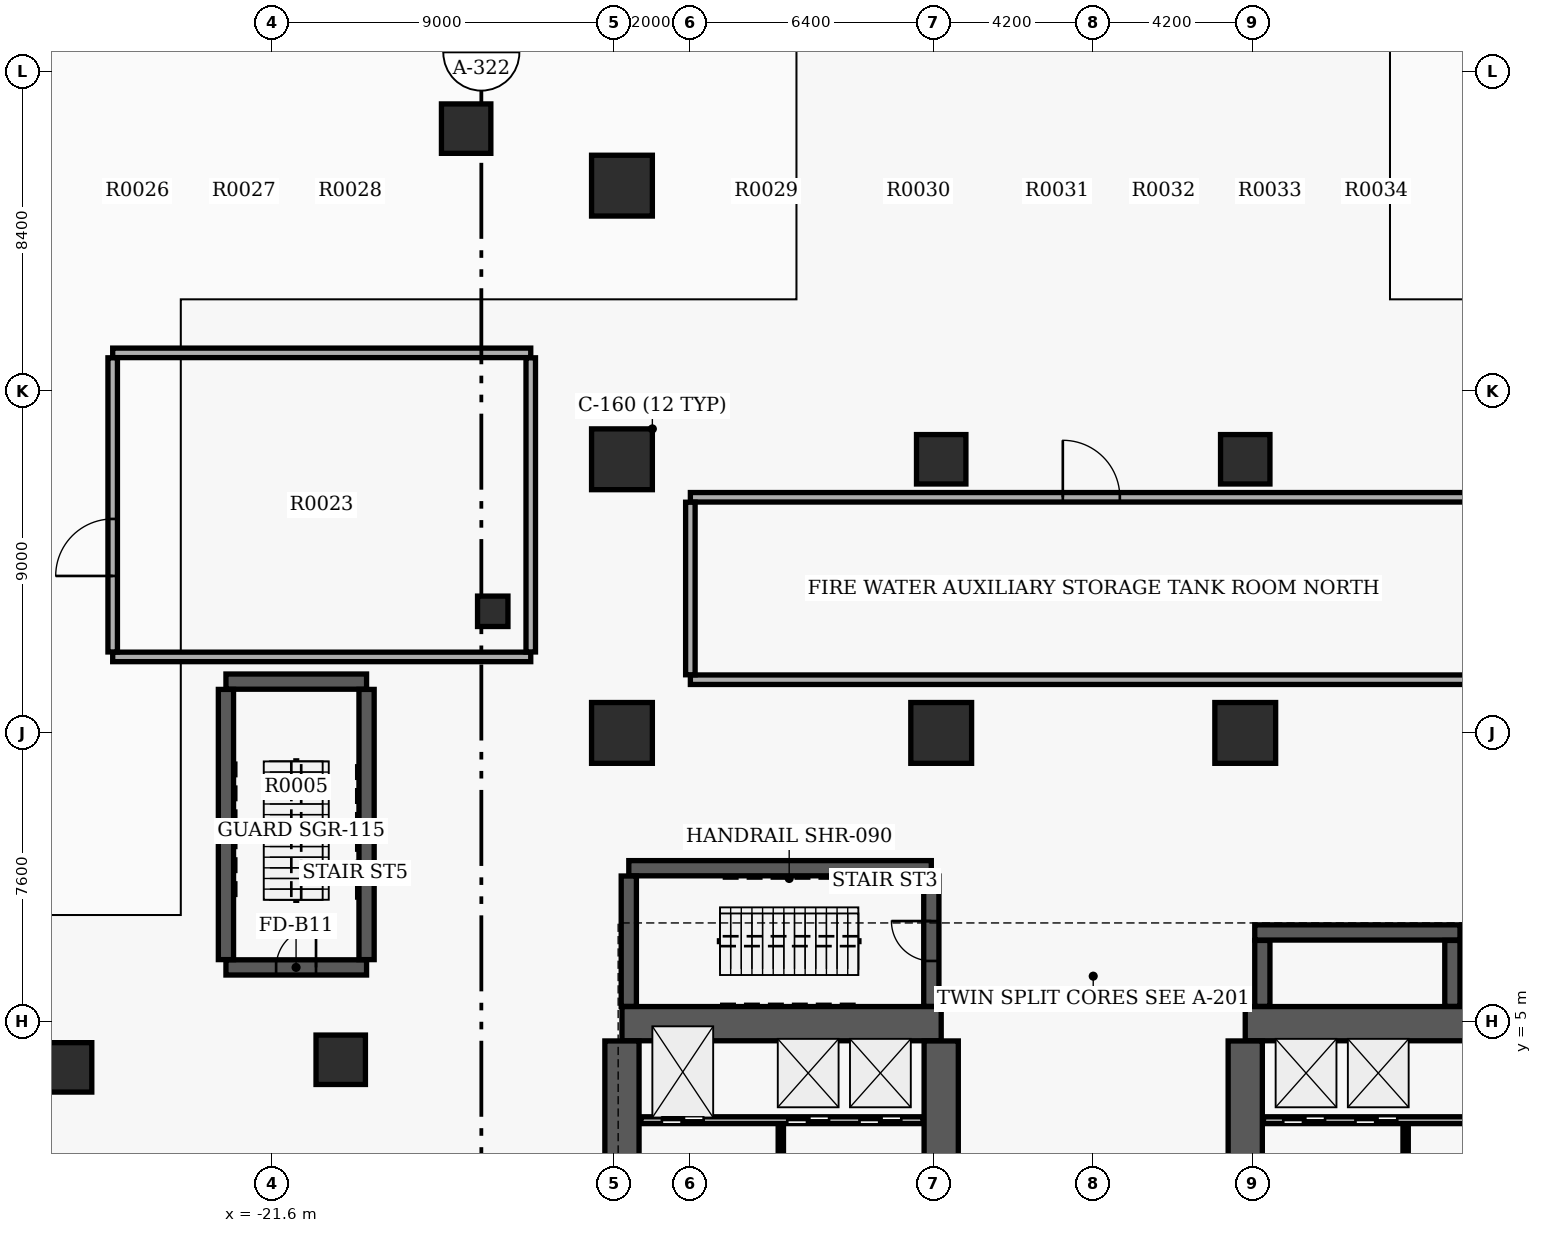
"""IFC4 building model, lengths in metres.
Left out: names, types, materials, properties, quantities, classifications, styles, units other than length and angle.
Written with IfcOpenShell. Run it as: python <this file> out.ifc"""

import sys

from ifc_helpers import new_model, si_unit, direction, frame, frame_2d, origin, origin_2d, place, context, subcontext, project, spatial, rectangle, circle, extrude, element, fill, save


model = new_model("IFC4")
c1 = context("Model", 3, precision=1e-05, world=origin(), true_north=direction((0.0, 1.0)))
c2 = subcontext(c1, "Body", "Model", "MODEL_VIEW")
j1 = project(units=[si_unit("LENGTHUNIT", "METRE"), si_unit("PLANEANGLEUNIT", "RADIAN")], contexts=[c1])
p1 = place(None, origin())
s1 = spatial("IfcSite", under=j1, at=p1, CompositionType="ELEMENT")
p2 = place(p1, origin())
s2 = spatial("IfcBuilding", under=s1, at=p2, CompositionType="ELEMENT")
p3 = place(p2, frame((0.0, 0.0, -10.4)))
s3 = spatial("IfcBuildingStorey", under=s2, at=p3, CompositionType="ELEMENT", Elevation=-10.4)
for number, where, z_axis, x_axis in (
    (1, (-12.4, 19.8, 0.0), (0.0, 0.0, 1.0), (1.0, 0.0, 0.0)),
    (2, (-12.4, 27.0, 0.0), (0.0, 0.0, 1.0), (1.0, 0.0, 0.0)),
):
    element("IfcColumn", number, at=place(p3, frame(where, z_axis=z_axis, x_axis=x_axis)), inside=s3, PredefinedType="COLUMN", context=c2, shape_type="SweptSolid", body=[
        extrude(rectangle(XDim=1.6, YDim=1.6, at=origin_2d()), origin(), (0.0, 0.0, 1.0), 5.2),
    ])
p4 = place(p3, frame((-15.8, 15.8, 0.0), z_axis=(0.0, 0.0, 1.0), x_axis=(1.0, 0.0, 0.0)))
e3 = element("IfcColumn", 3, at=p4, inside=s3, PredefinedType="COLUMN", context=c2, shape_type="SweptSolid", body=[
    extrude(rectangle(XDim=0.8, YDim=0.8, at=origin_2d()), origin(), (0.0, 0.0, 1.0), 5.2),
])
p5 = place(p3, frame((-12.4, 4.95, 0.0), z_axis=(0.0, 0.0, 1.0), x_axis=(1.0, 0.0, 0.0)))
e4 = element("IfcWall", 4, at=p5, inside=s3, PredefinedType="SHEAR", context=c2, shape_type="SweptSolid", body=[
    extrude(rectangle(XDim=8.4, YDim=0.9, at=frame_2d((4.2, 0.0))), origin(), (0.0, 0.0, 1.0), 4.85),
])
p6 = place(p3, frame((-12.4, -6.395, 0.0), z_axis=(0.0, 0.0, 1.0), x_axis=(0.0, 1.0, 0.0)))
e5 = element("IfcWall", 5, at=p6, inside=s3, PredefinedType="SHEAR", context=c2, shape_type="SweptSolid", body=[
    extrude(rectangle(XDim=10.89, YDim=0.9, at=frame_2d((5.445, 0.0))), origin(), (0.0, 0.0, 1.0), 4.85),
])
p7 = place(p3, frame((-4.0, -6.395, 0.0), z_axis=(0.0, 0.0, 1.0), x_axis=(0.0, 1.0, 0.0)))
e6 = element("IfcWall", 6, at=p7, inside=s3, PredefinedType="SHEAR", context=c2, shape_type="SweptSolid", body=[
    extrude(rectangle(XDim=10.89, YDim=0.9, at=frame_2d((5.445, 0.0))), origin(), (0.0, 0.0, 1.0), 4.85),
])
p8 = place(p7, frame((1.145, 0.0, 0.0)))
e7 = element("IfcOpeningElement", 7, at=p8, cuts=e6, PredefinedType="OPENING", context=c2, shape_type="SweptSolid", body=[
    extrude(rectangle(XDim=1.05, YDim=2.15, at=frame_2d((0.525, 1.075))), frame((0.0, 0.46, 0.0), z_axis=(0.0, -1.0, 0.0), x_axis=(1.0, 0.0, 0.0)), (0.0, 0.0, 1.0), 0.92),
])
p9 = place(p7, frame((6.745, 0.0, 0.0)))
e8 = element("IfcOpeningElement", 8, at=p9, cuts=e6, PredefinedType="OPENING", context=c2, shape_type="SweptSolid", body=[
    extrude(rectangle(XDim=1.05, YDim=2.15, at=frame_2d((0.525, 1.075))), frame((0.0, 0.46, 0.0), z_axis=(0.0, -1.0, 0.0), x_axis=(1.0, 0.0, 0.0)), (0.0, 0.0, 1.0), 0.92),
])
p10 = place(p3, frame((4.0, 4.95, 0.0), z_axis=(0.0, 0.0, 1.0), x_axis=(1.0, 0.0, 0.0)))
e9 = element("IfcWall", 9, at=p10, inside=s3, PredefinedType="SHEAR", context=c2, shape_type="SweptSolid", body=[
    extrude(rectangle(XDim=8.4, YDim=0.9, at=frame_2d((4.2, 0.0))), origin(), (0.0, 0.0, 1.0), 4.85),
])
p11 = place(p3, frame((4.0, -6.395, 0.0), z_axis=(0.0, 0.0, 1.0), x_axis=(0.0, 1.0, 0.0)))
e10 = element("IfcWall", 10, at=p11, inside=s3, PredefinedType="SHEAR", context=c2, shape_type="SweptSolid", body=[
    extrude(rectangle(XDim=10.89, YDim=0.9, at=frame_2d((5.445, 0.0))), origin(), (0.0, 0.0, 1.0), 4.85),
])
p12 = place(p11, frame((1.145, 0.0, 0.0)))
e11 = element("IfcOpeningElement", 11, at=p12, cuts=e10, PredefinedType="OPENING", context=c2, shape_type="SweptSolid", body=[
    extrude(rectangle(XDim=1.05, YDim=2.15, at=frame_2d((0.525, 1.075))), frame((0.0, 0.46, 0.0), z_axis=(0.0, -1.0, 0.0), x_axis=(1.0, 0.0, 0.0)), (0.0, 0.0, 1.0), 0.92),
])
p13 = place(p11, frame((6.745, 0.0, 0.0)))
e12 = element("IfcOpeningElement", 12, at=p13, cuts=e10, PredefinedType="OPENING", context=c2, shape_type="SweptSolid", body=[
    extrude(rectangle(XDim=1.05, YDim=2.15, at=frame_2d((0.525, 1.075))), frame((0.0, 0.46, 0.0), z_axis=(0.0, -1.0, 0.0), x_axis=(1.0, 0.0, 0.0)), (0.0, 0.0, 1.0), 0.92),
])
p14 = place(p3, frame((-12.22, 9.04, 0.0), z_axis=(0.0, 0.0, 1.0), x_axis=(1.0, 0.0, 0.0)))
e13 = element("IfcWall", 13, at=p14, inside=s3, PredefinedType="SHEAR", context=c2, shape_type="SweptSolid", body=[
    extrude(rectangle(XDim=7.96, YDim=0.4, at=frame_2d((3.98, 0.0))), origin(), (0.0, 0.0, 1.0), 4.85),
])
p15 = place(p3, frame((-12.22, 5.405, 0.0), z_axis=(0.0, 0.0, 1.0), x_axis=(0.0, 1.0, 0.0)))
e14 = element("IfcWall", 14, at=p15, inside=s3, PredefinedType="SHEAR", context=c2, shape_type="SweptSolid", body=[
    extrude(rectangle(XDim=3.43, YDim=0.4, at=frame_2d((1.715, 0.0))), origin(), (0.0, 0.0, 1.0), 4.85),
])
p16 = place(p3, frame((-4.26, 5.405, 0.0), z_axis=(0.0, 0.0, 1.0), x_axis=(0.0, 1.0, 0.0)))
e15 = element("IfcWall", 15, at=p16, inside=s3, PredefinedType="SHEAR", context=c2, shape_type="SweptSolid", body=[
    extrude(rectangle(XDim=3.43, YDim=0.4, at=frame_2d((1.715, 0.0))), origin(), (0.0, 0.0, 1.0), 4.85),
])
p17 = place(p16, frame((1.195, 0.0, 0.0)))
e16 = element("IfcOpeningElement", 16, at=p17, cuts=e15, PredefinedType="OPENING", context=c2, shape_type="SweptSolid", body=[
    extrude(rectangle(XDim=1.05, YDim=2.15, at=frame_2d((0.525, 1.075))), frame((0.0, 0.21, 0.0), z_axis=(0.0, -1.0, 0.0), x_axis=(1.0, 0.0, 0.0)), (0.0, 0.0, 1.0), 0.42),
])
p18 = place(p3, frame((-22.82, 13.95, 0.0), z_axis=(0.0, 0.0, 1.0), x_axis=(1.0, 0.0, 0.0)))
e17 = element("IfcWall", 17, at=p18, inside=s3, PredefinedType="SHEAR", context=c2, shape_type="SweptSolid", body=[
    extrude(rectangle(XDim=3.7, YDim=0.4, at=frame_2d((1.85, 0.0))), origin(), (0.0, 0.0, 1.0), 4.85),
])
p19 = place(p3, frame((-22.82, 6.43, 0.0), z_axis=(0.0, 0.0, 1.0), x_axis=(1.0, 0.0, 0.0)))
e18 = element("IfcWall", 18, at=p19, inside=s3, PredefinedType="SHEAR", context=c2, shape_type="SweptSolid", body=[
    extrude(rectangle(XDim=3.7, YDim=0.4, at=frame_2d((1.85, 0.0))), origin(), (0.0, 0.0, 1.0), 4.85),
])
p20 = place(p19, frame((1.32, 0.0, 0.0)))
e19 = element("IfcOpeningElement", 19, at=p20, cuts=e18, PredefinedType="OPENING", context=c2, shape_type="SweptSolid", body=[
    extrude(rectangle(XDim=1.05, YDim=2.15, at=frame_2d((0.525, 1.075))), frame((0.0, 0.21, 0.0), z_axis=(0.0, -1.0, 0.0), x_axis=(1.0, 0.0, 0.0)), (0.0, 0.0, 1.0), 0.42),
])
for number, where, z_axis, x_axis in (
    (20, (-22.82, 6.635, 0.0), (0.0, 0.0, 1.0), (0.0, 1.0, 0.0)),
    (21, (-19.12, 6.635, 0.0), (0.0, 0.0, 1.0), (0.0, 1.0, 0.0)),
):
    element("IfcWall", number, at=place(p3, frame(where, z_axis=z_axis, x_axis=x_axis)), inside=s3, PredefinedType="SHEAR", context=c2, shape_type="SweptSolid", body=[
        extrude(rectangle(XDim=7.11, YDim=0.4, at=frame_2d((3.555, 0.0))), origin(), (0.0, 0.0, 1.0), 4.85),
    ])
p21 = place(p3, frame((4.45, 5.405, 0.0), z_axis=(0.0, 0.0, 1.0), x_axis=(0.0, 1.0, 0.0)))
e22 = element("IfcWall", 22, at=p21, inside=s3, PredefinedType="SHEAR", context=c2, shape_type="SweptSolid", body=[
    extrude(rectangle(XDim=1.735, YDim=0.4, at=frame_2d((0.867, 0.0))), origin(), (0.0, 0.0, 1.0), 4.85),
])
p22 = place(p3, frame((4.25, 7.35, 0.0), z_axis=(0.0, 0.0, 1.0), x_axis=(1.0, 0.0, 0.0)))
e23 = element("IfcWall", 23, at=p22, inside=s3, PredefinedType="SHEAR", context=c2, shape_type="SweptSolid", body=[
    extrude(rectangle(XDim=5.4, YDim=0.4, at=frame_2d((2.7, 0.0))), origin(), (0.0, 0.0, 1.0), 4.85),
])
p23 = place(p3, frame((9.45, 5.405, 0.0), z_axis=(0.0, 0.0, 1.0), x_axis=(0.0, 1.0, 0.0)))
e24 = element("IfcWall", 24, at=p23, inside=s3, PredefinedType="SHEAR", context=c2, shape_type="SweptSolid", body=[
    extrude(rectangle(XDim=1.735, YDim=0.4, at=frame_2d((0.867, 0.0))), origin(), (0.0, 0.0, 1.0), 4.85),
])
for number, where, z_axis, x_axis in (
    (25, (-12.4, 12.6, 0.0), (0.0, 0.0, 1.0), (1.0, 0.0, 0.0)),
    (26, (4.0, 12.6, 0.0), (0.0, 0.0, 1.0), (1.0, 0.0, 0.0)),
    (27, (-4.0, 12.6, 0.0), (0.0, 0.0, 1.0), (1.0, 0.0, 0.0)),
):
    element("IfcColumn", number, at=place(p3, frame(where, z_axis=z_axis, x_axis=x_axis)), inside=s3, PredefinedType="COLUMN", context=c2, shape_type="SweptSolid", body=[
        extrude(rectangle(XDim=1.6, YDim=1.6, at=origin_2d()), origin(), (0.0, 0.0, 1.0), 5.2),
    ])
for number, where, z_axis, x_axis in (
    (28, (-19.8, 4.0, 0.0), (0.0, 0.0, 1.0), (1.0, 0.0, 0.0)),
    (29, (-4.0, 19.8, 0.0), (0.0, 0.0, 1.0), (1.0, 0.0, 0.0)),
    (30, (4.0, 19.8, 0.0), (0.0, 0.0, 1.0), (1.0, 0.0, 0.0)),
    (31, (-27.0, 3.8, 0.0), (0.0, 0.0, 1.0), (1.0, 0.0, 0.0)),
):
    element("IfcColumn", number, at=place(p3, frame(where, z_axis=z_axis, x_axis=x_axis)), inside=s3, PredefinedType="COLUMN", context=c2, shape_type="SweptSolid", body=[
        extrude(rectangle(XDim=1.3, YDim=1.3, at=origin_2d()), origin(), (0.0, 0.0, 1.0), 5.2),
    ])
p24 = place(p3, frame((-16.5, 28.5, 0.0), z_axis=(0.0, 0.0, 1.0), x_axis=(1.0, 0.0, 0.0)))
e32 = element("IfcColumn", 32, at=p24, inside=s3, PredefinedType="COLUMN", context=c2, shape_type="SweptSolid", body=[
    extrude(circle(Radius=0.65, at=origin_2d()), origin(), (0.0, 0.0, 1.0), 5.2),
])
p25 = place(p3, frame((-11.9, 2.41, 0.0), z_axis=(0.0, 0.0, 1.0), x_axis=(1.0, 0.0, 0.0)))
e33 = element("IfcWall", 33, at=p25, inside=s3, PredefinedType="SOLIDWALL", context=c2, shape_type="SweptSolid", body=[
    extrude(rectangle(XDim=7.42, YDim=0.18, at=frame_2d((3.71, 0.0))), origin(), (0.0, 0.0, 1.0), 3.87),
])
p26 = place(p25, frame((0.55, 0.0, 0.0)))
e34 = element("IfcOpeningElement", 34, at=p26, cuts=e33, PredefinedType="OPENING", context=c2, shape_type="SweptSolid", body=[
    extrude(rectangle(XDim=1.1, YDim=2.15, at=frame_2d((0.55, 1.075))), frame((0.0, 0.1, 0.0), z_axis=(0.0, -1.0, 0.0), x_axis=(1.0, 0.0, 0.0)), (0.0, 0.0, 1.0), 0.2),
])
p27 = place(p25, frame((3.85, 0.0, 0.0)))
e35 = element("IfcOpeningElement", 35, at=p27, cuts=e33, PredefinedType="OPENING", context=c2, shape_type="SweptSolid", body=[
    extrude(rectangle(XDim=1.1, YDim=2.15, at=frame_2d((0.55, 1.075))), frame((0.0, 0.1, 0.0), z_axis=(0.0, -1.0, 0.0), x_axis=(1.0, 0.0, 0.0)), (0.0, 0.0, 1.0), 0.2),
])
p28 = place(p25, frame((5.75, 0.0, 0.0)))
e36 = element("IfcOpeningElement", 36, at=p28, cuts=e33, PredefinedType="OPENING", context=c2, shape_type="SweptSolid", body=[
    extrude(rectangle(XDim=1.1, YDim=2.15, at=frame_2d((0.55, 1.075))), frame((0.0, 0.1, 0.0), z_axis=(0.0, -1.0, 0.0), x_axis=(1.0, 0.0, 0.0)), (0.0, 0.0, 1.0), 0.2),
])
p29 = place(p3, frame((4.48, 2.41, 0.0), z_axis=(0.0, 0.0, 1.0), x_axis=(1.0, 0.0, 0.0)))
e37 = element("IfcWall", 37, at=p29, inside=s3, PredefinedType="SOLIDWALL", context=c2, shape_type="SweptSolid", body=[
    extrude(rectangle(XDim=7.42, YDim=0.18, at=frame_2d((3.71, 0.0))), origin(), (0.0, 0.0, 1.0), 3.87),
])
p30 = place(p29, frame((5.67, 0.0, 0.0)))
e38 = element("IfcOpeningElement", 38, at=p30, cuts=e37, PredefinedType="OPENING", context=c2, shape_type="SweptSolid", body=[
    extrude(rectangle(XDim=1.1, YDim=2.15, at=frame_2d((0.55, 1.075))), frame((0.0, 0.1, 0.0), z_axis=(0.0, -1.0, 0.0), x_axis=(1.0, 0.0, 0.0)), (0.0, 0.0, 1.0), 0.2),
])
p31 = place(p29, frame((0.52, 0.0, 0.0)))
e39 = element("IfcOpeningElement", 39, at=p31, cuts=e37, PredefinedType="OPENING", context=c2, shape_type="SweptSolid", body=[
    extrude(rectangle(XDim=1.1, YDim=2.15, at=frame_2d((0.55, 1.075))), frame((0.0, 0.1, 0.0), z_axis=(0.0, -1.0, 0.0), x_axis=(1.0, 0.0, 0.0)), (0.0, 0.0, 1.0), 0.2),
])
p32 = place(p29, frame((2.42, 0.0, 0.0)))
e40 = element("IfcOpeningElement", 40, at=p32, cuts=e37, PredefinedType="OPENING", context=c2, shape_type="SweptSolid", body=[
    extrude(rectangle(XDim=1.1, YDim=2.15, at=frame_2d((0.55, 1.075))), frame((0.0, 0.1, 0.0), z_axis=(0.0, -1.0, 0.0), x_axis=(1.0, 0.0, 0.0)), (0.0, 0.0, 1.0), 0.2),
])
p33 = place(p3, frame((-8.22, -0.65, 0.0), z_axis=(0.0, 0.0, 1.0), x_axis=(0.0, 1.0, 0.0)))
e41 = element("IfcWall", 41, at=p33, inside=s3, PredefinedType="SOLIDWALL", context=c2, shape_type="SweptSolid", body=[
    extrude(rectangle(XDim=2.96, YDim=0.14, at=frame_2d((1.48, 0.0))), origin(), (0.0, 0.0, 1.0), 3.87),
])
p34 = place(p33, frame((0.55, 0.0, 0.0)))
e42 = element("IfcOpeningElement", 42, at=p34, cuts=e41, PredefinedType="OPENING", context=c2, shape_type="SweptSolid", body=[
    extrude(rectangle(XDim=0.88, YDim=2.1, at=frame_2d((0.44, 1.05))), frame((0.0, 0.08, 0.0), z_axis=(0.0, -1.0, 0.0), x_axis=(1.0, 0.0, 0.0)), (0.0, 0.0, 1.0), 0.16),
])
p35 = place(p3, frame((8.22, -0.65, 0.0), z_axis=(0.0, 0.0, 1.0), x_axis=(0.0, 1.0, 0.0)))
e43 = element("IfcWall", 43, at=p35, inside=s3, PredefinedType="SOLIDWALL", context=c2, shape_type="SweptSolid", body=[
    extrude(rectangle(XDim=2.96, YDim=0.14, at=frame_2d((1.48, 0.0))), origin(), (0.0, 0.0, 1.0), 3.87),
])
p36 = place(p35, frame((0.55, 0.0, 0.0)))
e44 = element("IfcOpeningElement", 44, at=p36, cuts=e43, PredefinedType="OPENING", context=c2, shape_type="SweptSolid", body=[
    extrude(rectangle(XDim=0.88, YDim=2.1, at=frame_2d((0.44, 1.05))), frame((0.0, 0.08, 0.0), z_axis=(0.0, -1.0, 0.0), x_axis=(1.0, 0.0, 0.0)), (0.0, 0.0, 1.0), 0.16),
])
p37 = place(p3, frame((-10.6, 14.0, 0.0), z_axis=(0.0, 0.0, 1.0), x_axis=(1.0, 0.0, 0.0)))
e45 = element("IfcWall", 45, at=p37, inside=s3, PredefinedType="SOLIDWALL", context=c2, shape_type="SweptSolid", body=[
    extrude(rectangle(XDim=21.2, YDim=0.25, at=frame_2d((10.6, 0.0))), origin(), (0.0, 0.0, 1.0), 3.87),
])
p38 = place(p3, frame((-10.6, 18.8, 0.0), z_axis=(0.0, 0.0, 1.0), x_axis=(1.0, 0.0, 0.0)))
e46 = element("IfcWall", 46, at=p38, inside=s3, PredefinedType="SOLIDWALL", context=c2, shape_type="SweptSolid", body=[
    extrude(rectangle(XDim=21.2, YDim=0.25, at=frame_2d((10.6, 0.0))), origin(), (0.0, 0.0, 1.0), 3.87),
])
p39 = place(p38, frame((9.8, 0.0, 0.0)))
e47 = element("IfcOpeningElement", 47, at=p39, cuts=e46, PredefinedType="OPENING", context=c2, shape_type="SweptSolid", body=[
    extrude(rectangle(XDim=1.5, YDim=2.15, at=frame_2d((0.75, 1.075))), frame((0.0, 0.135, 0.0), z_axis=(0.0, -1.0, 0.0), x_axis=(1.0, 0.0, 0.0)), (0.0, 0.0, 1.0), 0.27),
])
p40 = place(p3, frame((-10.6, 14.13, 0.0), z_axis=(0.0, 0.0, 1.0), x_axis=(0.0, 1.0, 0.0)))
e48 = element("IfcWall", 48, at=p40, inside=s3, PredefinedType="SOLIDWALL", context=c2, shape_type="SweptSolid", body=[
    extrude(rectangle(XDim=4.54, YDim=0.25, at=frame_2d((2.27, 0.0))), origin(), (0.0, 0.0, 1.0), 3.87),
])
for number, where, z_axis, x_axis in (
    (49, (-25.8, 14.6, 0.0), (0.0, 0.0, 1.0), (1.0, 0.0, 0.0)),
    (50, (-25.8, 22.6, 0.0), (0.0, 0.0, 1.0), (1.0, 0.0, 0.0)),
):
    element("IfcWall", number, at=place(p3, frame(where, z_axis=z_axis, x_axis=x_axis)), inside=s3, PredefinedType="SOLIDWALL", context=c2, shape_type="SweptSolid", body=[
        extrude(rectangle(XDim=11.0, YDim=0.25, at=frame_2d((5.5, 0.0))), origin(), (0.0, 0.0, 1.0), 3.87),
    ])
p41 = place(p3, frame((-25.8, 14.73, 0.0), z_axis=(0.0, 0.0, 1.0), x_axis=(0.0, 1.0, 0.0)))
e51 = element("IfcWall", 51, at=p41, inside=s3, PredefinedType="SOLIDWALL", context=c2, shape_type="SweptSolid", body=[
    extrude(rectangle(XDim=7.74, YDim=0.25, at=frame_2d((3.87, 0.0))), origin(), (0.0, 0.0, 1.0), 3.87),
])
p42 = place(p41, frame((2.0, 0.0, 0.0)))
e52 = element("IfcOpeningElement", 52, at=p42, cuts=e51, PredefinedType="OPENING", context=c2, shape_type="SweptSolid", body=[
    extrude(rectangle(XDim=1.5, YDim=2.15, at=frame_2d((0.75, 1.075))), frame((0.0, 0.135, 0.0), z_axis=(0.0, -1.0, 0.0), x_axis=(1.0, 0.0, 0.0)), (0.0, 0.0, 1.0), 0.27),
])
p43 = place(p3, frame((-14.8, 14.73, 0.0), z_axis=(0.0, 0.0, 1.0), x_axis=(0.0, 1.0, 0.0)))
e53 = element("IfcWall", 53, at=p43, inside=s3, PredefinedType="SOLIDWALL", context=c2, shape_type="SweptSolid", body=[
    extrude(rectangle(XDim=7.74, YDim=0.25, at=frame_2d((3.87, 0.0))), origin(), (0.0, 0.0, 1.0), 3.87),
])
p44 = place(p17, origin())
e54 = element("IfcDoor", 54, at=p44, inside=s3, OperationType="SINGLE_SWING_RIGHT", PredefinedType="DOOR", context=c2, shape_type="SweptSolid", body=[
    extrude(rectangle(XDim=1.05, YDim=2.15, at=frame_2d((0.525, 1.075))), frame((0.0, 0.025, 0.0), z_axis=(0.0, -1.0, 0.0), x_axis=(1.0, 0.0, 0.0)), (0.0, 0.0, 1.0), 0.05),
])
fill(e16, e54)
p45 = place(p20, origin())
e55 = element("IfcDoor", 55, at=p45, inside=s3, OperationType="SINGLE_SWING_RIGHT", PredefinedType="DOOR", context=c2, shape_type="SweptSolid", body=[
    extrude(rectangle(XDim=1.05, YDim=2.15, at=frame_2d((0.525, 1.075))), frame((0.0, 0.025, 0.0), z_axis=(0.0, -1.0, 0.0), x_axis=(1.0, 0.0, 0.0)), (0.0, 0.0, 1.0), 0.05),
])
fill(e19, e55)
p46 = place(p26, origin())
e56 = element("IfcDoor", 56, at=p46, inside=s3, OperationType="DOUBLE_DOOR_SLIDING", PredefinedType="DOOR", context=c2, shape_type="SweptSolid", body=[
    extrude(rectangle(XDim=1.1, YDim=2.15, at=frame_2d((0.55, 1.075))), frame((0.0, 0.025, 0.0), z_axis=(0.0, -1.0, 0.0), x_axis=(1.0, 0.0, 0.0)), (0.0, 0.0, 1.0), 0.05),
])
fill(e34, e56)
p47 = place(p27, origin())
e57 = element("IfcDoor", 57, at=p47, inside=s3, OperationType="DOUBLE_DOOR_SLIDING", PredefinedType="DOOR", context=c2, shape_type="SweptSolid", body=[
    extrude(rectangle(XDim=1.1, YDim=2.15, at=frame_2d((0.55, 1.075))), frame((0.0, 0.025, 0.0), z_axis=(0.0, -1.0, 0.0), x_axis=(1.0, 0.0, 0.0)), (0.0, 0.0, 1.0), 0.05),
])
fill(e35, e57)
p48 = place(p28, origin())
e58 = element("IfcDoor", 58, at=p48, inside=s3, OperationType="DOUBLE_DOOR_SLIDING", PredefinedType="DOOR", context=c2, shape_type="SweptSolid", body=[
    extrude(rectangle(XDim=1.1, YDim=2.15, at=frame_2d((0.55, 1.075))), frame((0.0, 0.025, 0.0), z_axis=(0.0, -1.0, 0.0), x_axis=(1.0, 0.0, 0.0)), (0.0, 0.0, 1.0), 0.05),
])
fill(e36, e58)
p49 = place(p31, origin())
e59 = element("IfcDoor", 59, at=p49, inside=s3, OperationType="DOUBLE_DOOR_SLIDING", PredefinedType="DOOR", context=c2, shape_type="SweptSolid", body=[
    extrude(rectangle(XDim=1.1, YDim=2.15, at=frame_2d((0.55, 1.075))), frame((0.0, 0.025, 0.0), z_axis=(0.0, -1.0, 0.0), x_axis=(1.0, 0.0, 0.0)), (0.0, 0.0, 1.0), 0.05),
])
fill(e39, e59)
p50 = place(p32, origin())
e60 = element("IfcDoor", 60, at=p50, inside=s3, OperationType="DOUBLE_DOOR_SLIDING", PredefinedType="DOOR", context=c2, shape_type="SweptSolid", body=[
    extrude(rectangle(XDim=1.1, YDim=2.15, at=frame_2d((0.55, 1.075))), frame((0.0, 0.025, 0.0), z_axis=(0.0, -1.0, 0.0), x_axis=(1.0, 0.0, 0.0)), (0.0, 0.0, 1.0), 0.05),
])
fill(e40, e60)
p51 = place(p39, origin())
e61 = element("IfcDoor", 61, at=p51, inside=s3, OperationType="DOUBLE_DOOR_SINGLE_SWING", PredefinedType="DOOR", context=c2, shape_type="SweptSolid", body=[
    extrude(rectangle(XDim=1.5, YDim=2.15, at=frame_2d((0.75, 1.075))), frame((0.0, 0.025, 0.0), z_axis=(0.0, -1.0, 0.0), x_axis=(1.0, 0.0, 0.0)), (0.0, 0.0, 1.0), 0.05),
])
fill(e47, e61)
p52 = place(p42, origin())
e62 = element("IfcDoor", 62, at=p52, inside=s3, OperationType="DOUBLE_DOOR_SINGLE_SWING", PredefinedType="DOOR", context=c2, shape_type="SweptSolid", body=[
    extrude(rectangle(XDim=1.5, YDim=2.15, at=frame_2d((0.75, 1.075))), frame((0.0, 0.025, 0.0), z_axis=(0.0, -1.0, 0.0), x_axis=(1.0, 0.0, 0.0)), (0.0, 0.0, 1.0), 0.05),
])
fill(e52, e62)
save(model, sys.argv[1])
